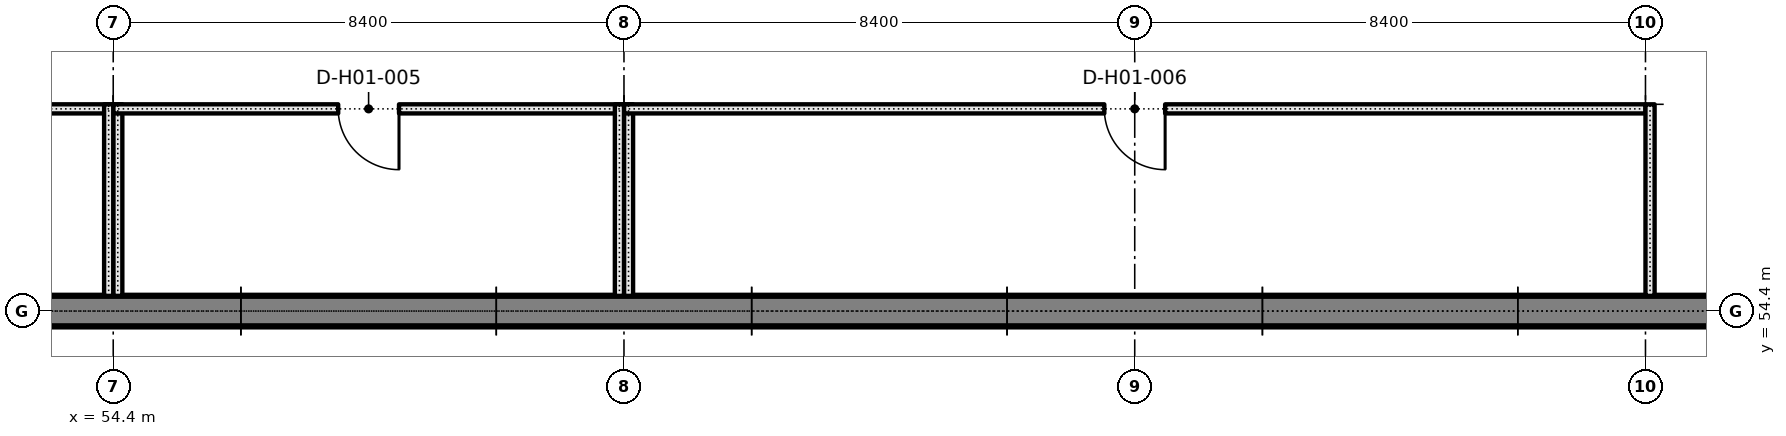
"""IFC4 building model, lengths in metres.
Left out: names, types, materials, properties, quantities, classifications, styles, units other than length and angle.
Written with IfcOpenShell. Run it as: python <this file> out.ifc"""

import sys

from ifc_helpers import new_model, si_unit, direction, frame, frame_2d, origin, place, context, subcontext, project, spatial, rectangle, extrude, element, fill, save


model = new_model("IFC4")
c1 = context("Model", 3, precision=1e-05, world=origin(), true_north=direction((0.0, 1.0)))
c2 = subcontext(c1, "Body", "Model", "MODEL_VIEW")
j1 = project(units=[si_unit("LENGTHUNIT", "METRE"), si_unit("PLANEANGLEUNIT", "RADIAN")], contexts=[c1])
p1 = place(None, origin())
s1 = spatial("IfcSite", under=j1, at=p1, CompositionType="ELEMENT")
p2 = place(p1, origin())
s2 = spatial("IfcBuilding", under=s1, at=p2, CompositionType="ELEMENT")
p3 = place(p2, frame((0.0, 0.0, 5.4)))
s3 = spatial("IfcBuildingStorey", under=s2, at=p3, CompositionType="ELEMENT", Elevation=5.4)
for number, where, z_axis, x_axis in (
    (1, (52.3, 54.4, 0.0), (0.0, 0.0, 1.0), (1.0, 0.0, 0.0)),
    (2, (60.7, 54.4, 0.0), (0.0, 0.0, 1.0), (1.0, 0.0, 0.0)),
    (3, (69.1, 54.4, 0.0), (0.0, 0.0, 1.0), (1.0, 0.0, 0.0)),
    (4, (77.5, 54.4, 0.0), (0.0, 0.0, 1.0), (1.0, 0.0, 0.0)),
):
    element("IfcWall", number, at=place(p3, frame(where, z_axis=z_axis, x_axis=x_axis)), inside=s3, PredefinedType="SOLIDWALL", context=c2, shape_type="SweptSolid", body=[
        extrude(rectangle(XDim=4.2, YDim=0.5, at=frame_2d((2.1, 0.0))), origin(), (0.0, 0.0, 1.0), 3.5),
    ])
p4 = place(p3, frame((56.5, 54.4, 0.0), z_axis=(0.0, 0.0, 1.0), x_axis=(1.0, 0.0, 0.0)))
e5 = element("IfcWall", 5, at=p4, inside=s3, PredefinedType="SOLIDWALL", context=c2, shape_type="SweptSolid", body=[
    extrude(rectangle(XDim=4.2, YDim=0.5, at=frame_2d((2.1, 0.0))), origin(), (0.0, 0.0, 1.0), 0.9),
])
p5 = place(p3, frame((64.9, 54.4, 0.0), z_axis=(0.0, 0.0, 1.0), x_axis=(1.0, 0.0, 0.0)))
e6 = element("IfcWall", 6, at=p5, inside=s3, PredefinedType="SOLIDWALL", context=c2, shape_type="SweptSolid", body=[
    extrude(rectangle(XDim=4.2, YDim=0.5, at=frame_2d((2.1, 0.0))), origin(), (0.0, 0.0, 1.0), 0.9),
])
p6 = place(p3, frame((73.3, 54.4, 0.0), z_axis=(0.0, 0.0, 1.0), x_axis=(1.0, 0.0, 0.0)))
e7 = element("IfcWall", 7, at=p6, inside=s3, PredefinedType="SOLIDWALL", context=c2, shape_type="SweptSolid", body=[
    extrude(rectangle(XDim=4.2, YDim=0.5, at=frame_2d((2.1, 0.0))), origin(), (0.0, 0.0, 1.0), 0.9),
])
p7 = place(p3, frame((29.45, 54.4, 3.5), z_axis=(0.0, 0.0, 1.0), x_axis=(1.0, 0.0, 0.0)))
e8 = element("IfcWall", 8, at=p7, inside=s3, PredefinedType="SOLIDWALL", context=c2, shape_type="SweptSolid", body=[
    extrude(rectangle(XDim=66.7, YDim=0.5, at=frame_2d((33.35, 0.0))), origin(), (0.0, 0.0, 1.0), 1.3),
])
p8 = place(p3, frame((46.0, 57.725, 0.0), z_axis=(0.0, 0.0, 1.0), x_axis=(1.0, 0.0, 0.0)))
e9 = element("IfcWall", 9, at=p8, inside=s3, PredefinedType="PARTITIONING", context=c2, shape_type="SweptSolid", body=[
    extrude(rectangle(XDim=8.4, YDim=0.15, at=frame_2d((4.2, 0.0))), origin(), (0.0, 0.0, 1.0), 4.55),
])
p9 = place(p8, frame((3.7, 0.0, 0.0)))
e10 = element("IfcOpeningElement", 10, at=p9, cuts=e9, PredefinedType="OPENING", context=c2, shape_type="SweptSolid", body=[
    extrude(rectangle(XDim=1.0, YDim=2.1, at=frame_2d((0.5, 1.05))), frame((0.0, 0.085, 0.0), z_axis=(0.0, -1.0, 0.0), x_axis=(1.0, 0.0, 0.0)), (0.0, 0.0, 1.0), 0.17),
])
p10 = place(p3, frame((54.475, 54.65, 0.0), z_axis=(0.0, 0.0, 1.0), x_axis=(0.0, 1.0, 0.0)))
e11 = element("IfcWall", 11, at=p10, inside=s3, PredefinedType="PARTITIONING", context=c2, shape_type="SweptSolid", body=[
    extrude(rectangle(XDim=3.15, YDim=0.15, at=frame_2d((1.575, 0.0))), origin(), (0.0, 0.0, 1.0), 4.55),
])
p11 = place(p3, frame((54.4, 57.725, 0.0), z_axis=(0.0, 0.0, 1.0), x_axis=(1.0, 0.0, 0.0)))
e12 = element("IfcWall", 12, at=p11, inside=s3, PredefinedType="PARTITIONING", context=c2, shape_type="SweptSolid", body=[
    extrude(rectangle(XDim=8.4, YDim=0.15, at=frame_2d((4.2, 0.0))), origin(), (0.0, 0.0, 1.0), 4.55),
])
p12 = place(p11, frame((3.7, 0.0, 0.0)))
e13 = element("IfcOpeningElement", 13, at=p12, cuts=e12, PredefinedType="OPENING", context=c2, shape_type="SweptSolid", body=[
    extrude(rectangle(XDim=1.0, YDim=2.1, at=frame_2d((0.5, 1.05))), frame((0.0, 0.085, 0.0), z_axis=(0.0, -1.0, 0.0), x_axis=(1.0, 0.0, 0.0)), (0.0, 0.0, 1.0), 0.17),
])
for number, where, z_axis, x_axis in (
    (14, (54.325, 54.65, 0.0), (0.0, 0.0, 1.0), (0.0, 1.0, 0.0)),
    (15, (62.875, 54.65, 0.0), (0.0, 0.0, 1.0), (0.0, 1.0, 0.0)),
):
    element("IfcWall", number, at=place(p3, frame(where, z_axis=z_axis, x_axis=x_axis)), inside=s3, PredefinedType="PARTITIONING", context=c2, shape_type="SweptSolid", body=[
        extrude(rectangle(XDim=3.15, YDim=0.15, at=frame_2d((1.575, 0.0))), origin(), (0.0, 0.0, 1.0), 4.55),
    ])
p13 = place(p3, frame((62.8, 57.725, 0.0), z_axis=(0.0, 0.0, 1.0), x_axis=(1.0, 0.0, 0.0)))
e16 = element("IfcWall", 16, at=p13, inside=s3, PredefinedType="PARTITIONING", context=c2, shape_type="SweptSolid", body=[
    extrude(rectangle(XDim=16.8, YDim=0.15, at=frame_2d((8.4, 0.0))), origin(), (0.0, 0.0, 1.0), 4.55),
])
p14 = place(p13, frame((7.9, 0.0, 0.0)))
e17 = element("IfcOpeningElement", 17, at=p14, cuts=e16, PredefinedType="OPENING", context=c2, shape_type="SweptSolid", body=[
    extrude(rectangle(XDim=1.0, YDim=2.1, at=frame_2d((0.5, 1.05))), frame((0.0, 0.085, 0.0), z_axis=(0.0, -1.0, 0.0), x_axis=(1.0, 0.0, 0.0)), (0.0, 0.0, 1.0), 0.17),
])
p15 = place(p3, frame((62.725, 54.65, 0.0), z_axis=(0.0, 0.0, 1.0), x_axis=(0.0, 1.0, 0.0)))
e18 = element("IfcWall", 18, at=p15, inside=s3, PredefinedType="PARTITIONING", context=c2, shape_type="SweptSolid", body=[
    extrude(rectangle(XDim=3.15, YDim=0.15, at=frame_2d((1.575, 0.0))), origin(), (0.0, 0.0, 1.0), 4.55),
])
p16 = place(p3, frame((79.675, 54.65, 0.0), z_axis=(0.0, 0.0, 1.0), x_axis=(0.0, 1.0, 0.0)))
e19 = element("IfcWall", 19, at=p16, inside=s3, PredefinedType="PARTITIONING", context=c2, shape_type="SweptSolid", body=[
    extrude(rectangle(XDim=3.15, YDim=0.15, at=frame_2d((1.575, 0.0))), origin(), (0.0, 0.0, 1.0), 3.95),
])
p17 = place(p12, frame((1.0, 0.0, 0.0), z_axis=(0.0, 0.0, 1.0), x_axis=(-1.0, 0.0, 0.0)))
e20 = element("IfcDoor", 20, at=p17, inside=s3, OperationType="SINGLE_SWING_LEFT", PredefinedType="DOOR", context=c2, shape_type="SweptSolid", body=[
    extrude(rectangle(XDim=1.0, YDim=2.1, at=frame_2d((0.5, 1.05))), frame((0.0, 0.025, 0.0), z_axis=(0.0, -1.0, 0.0), x_axis=(1.0, 0.0, 0.0)), (0.0, 0.0, 1.0), 0.05),
])
fill(e13, e20)
p18 = place(p14, frame((1.0, 0.0, 0.0), z_axis=(0.0, 0.0, 1.0), x_axis=(-1.0, 0.0, 0.0)))
e21 = element("IfcDoor", 21, at=p18, inside=s3, OperationType="SINGLE_SWING_LEFT", PredefinedType="DOOR", context=c2, shape_type="SweptSolid", body=[
    extrude(rectangle(XDim=1.0, YDim=2.1, at=frame_2d((0.5, 1.05))), frame((0.0, 0.025, 0.0), z_axis=(0.0, -1.0, 0.0), x_axis=(1.0, 0.0, 0.0)), (0.0, 0.0, 1.0), 0.05),
])
fill(e17, e21)
save(model, sys.argv[1])
